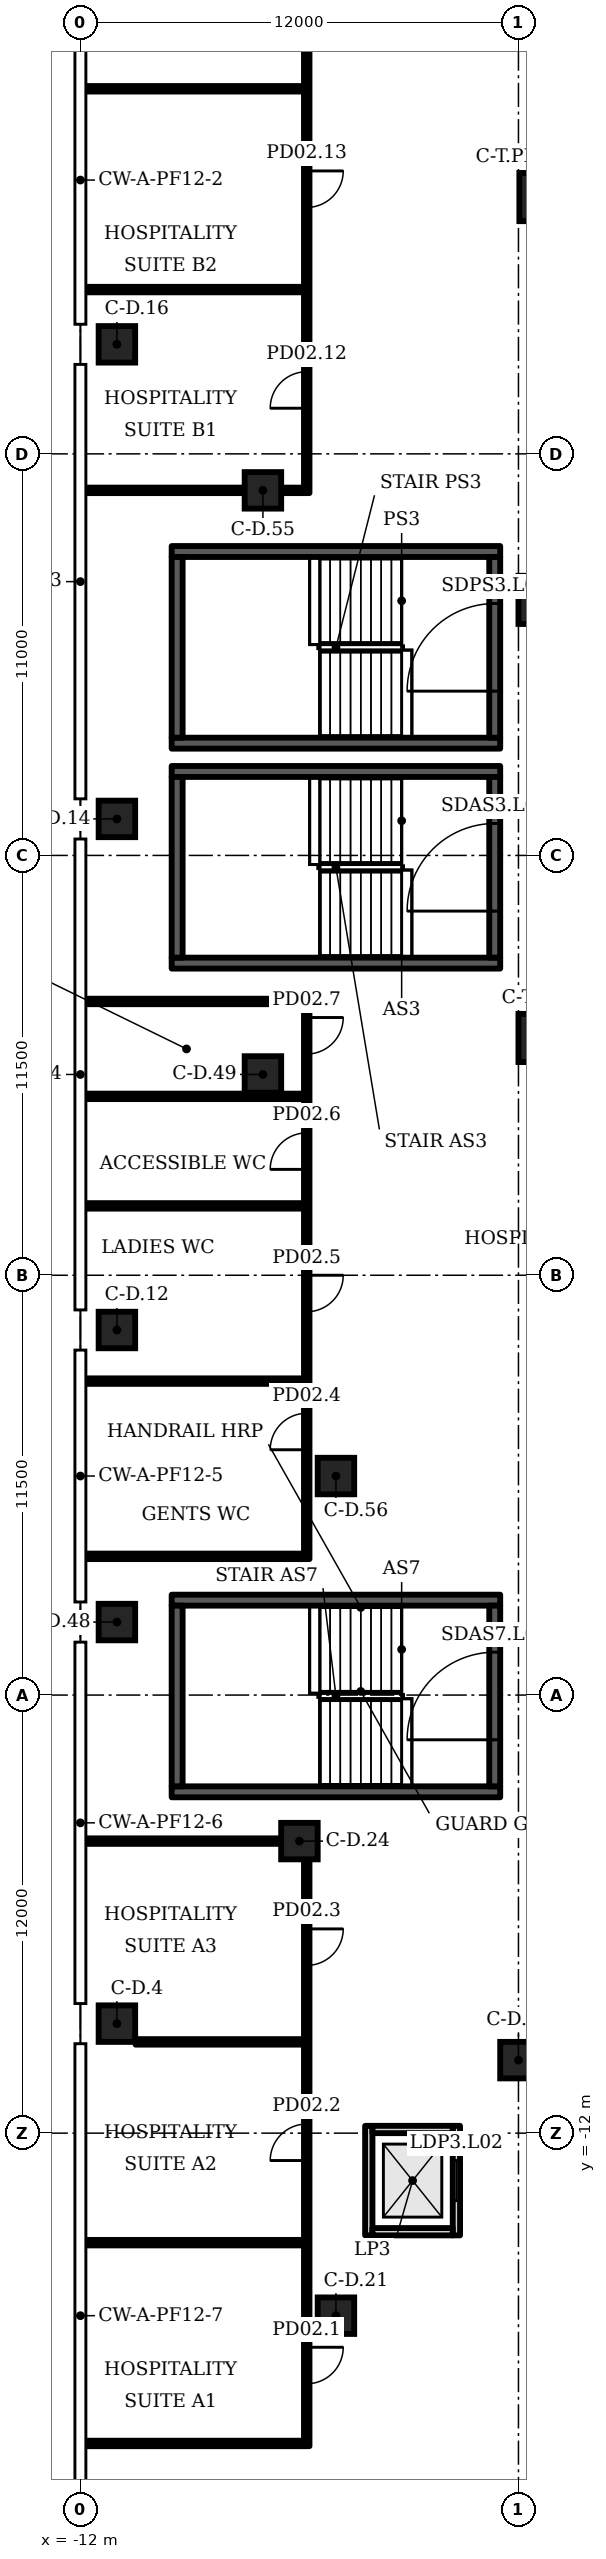
"""IFC4 building model, lengths in metres.
Left out: names, types, materials, properties, quantities, classifications, styles, units other than length and angle.
Written with IfcOpenShell. Run it as: python <this file> out.ifc"""

import sys

from ifc_helpers import new_model, si_unit, direction, frame, frame_2d, origin, origin_2d, place, context, subcontext, project, spatial, rectangle, extrude, element, fill, save


model = new_model("IFC4")
c1 = context("Model", 3, precision=1e-05, world=origin(), true_north=direction((0.0, 1.0)))
c2 = subcontext(c1, "Body", "Model", "MODEL_VIEW")
j1 = project(units=[si_unit("LENGTHUNIT", "METRE"), si_unit("PLANEANGLEUNIT", "RADIAN")], contexts=[c1])
p1 = place(None, origin())
s1 = spatial("IfcSite", under=j1, at=p1, CompositionType="ELEMENT")
p2 = place(p1, origin())
s2 = spatial("IfcBuilding", under=s1, at=p2, CompositionType="ELEMENT")
p3 = place(p2, frame((0.0, 0.0, 15.0)))
s3 = spatial("IfcBuildingStorey", under=s2, at=p3, CompositionType="ELEMENT", Elevation=15.0)
for number, where, z_axis, x_axis in (
    (1, (0.685, 41.034, 0.0), (0.0, 0.0, 1.0), (1.0, 0.0, 0.0)),
    (2, (0.66, 30.0, 0.0), (0.0, 0.0, 1.0), (1.0, 0.0, 0.0)),
    (3, (0.66, 18.0, 0.0), (0.0, 0.0, 1.0), (1.0, 0.0, 0.0)),
):
    element("IfcColumn", number, at=place(p3, frame(where, z_axis=z_axis, x_axis=x_axis)), inside=s3, PredefinedType="COLUMN", context=c2, shape_type="SweptSolid", body=[
        extrude(rectangle(XDim=1.32, YDim=1.32, at=origin_2d()), origin(), (0.0, 0.0, 1.0), 6.5),
    ])
for number, where, z_axis, x_axis in (
    (4, (-11.0, -9.0, 0.0), (0.0, 0.0, 1.0), (1.0, 0.0, 0.0)),
    (5, (-11.0, 10.0, 0.0), (0.0, 0.0, 1.0), (1.0, 0.0, 0.0)),
    (6, (-11.0, 24.0, 0.0), (0.0, 0.0, 1.0), (1.0, 0.0, 0.0)),
    (7, (-11.0, 37.0, 0.0), (0.0, 0.0, 1.0), (1.0, 0.0, 0.0)),
    (8, (-5.0, -17.0, 0.0), (0.0, 0.0, 1.0), (1.0, 0.0, 0.0)),
    (9, (-6.0, -4.0, 0.0), (0.0, 0.0, 1.0), (1.0, 0.0, 0.0)),
    (10, (0.0, -10.0, 0.0), (0.0, 0.0, 1.0), (1.0, 0.0, 0.0)),
    (11, (-11.0, 2.0, 0.0), (0.0, 0.0, 1.0), (1.0, 0.0, 0.0)),
    (12, (-7.0, 17.0, 0.0), (0.0, 0.0, 1.0), (1.0, 0.0, 0.0)),
    (13, (-7.0, 33.0, 0.0), (0.0, 0.0, 1.0), (1.0, 0.0, 0.0)),
    (14, (-5.0, 6.0, 0.0), (0.0, 0.0, 1.0), (1.0, 0.0, 0.0)),
):
    element("IfcColumn", number, at=place(p3, frame(where, z_axis=z_axis, x_axis=x_axis)), inside=s3, PredefinedType="COLUMN", context=c2, shape_type="SweptSolid", body=[
        extrude(rectangle(XDim=1.0, YDim=1.0, at=origin_2d()), origin(), (0.0, 0.0, 1.0), 6.5),
    ])
p4 = place(p3, frame((-11.895, -20.5, 0.0), z_axis=(0.0, 0.0, 1.0), x_axis=(1.0, 0.0, 0.0)))
e15 = element("IfcWall", 15, at=p4, inside=s3, PredefinedType="PARTITIONING", context=c2, shape_type="SweptSolid", body=[
    extrude(rectangle(XDim=6.02, YDim=0.15, at=frame_2d((3.01, 0.0))), origin(), (0.0, 0.0, 1.0), 6.2),
])
p5 = place(p3, frame((-5.8, -20.575, 0.0), z_axis=(0.0, 0.0, 1.0), x_axis=(0.0, 1.0, 0.0)))
e16 = element("IfcWall", 16, at=p5, inside=s3, PredefinedType="PARTITIONING", context=c2, shape_type="SweptSolid", body=[
    extrude(rectangle(XDim=16.065, YDim=0.15, at=frame_2d((8.032, 0.0))), origin(), (0.0, 0.0, 1.0), 6.2),
])
p6 = place(p5, frame((1.71, 0.0, 0.0)))
e17 = element("IfcOpeningElement", 17, at=p6, cuts=e16, PredefinedType="OPENING", context=c2, shape_type="SweptSolid", body=[
    extrude(rectangle(XDim=1.0, YDim=2.1, at=frame_2d((0.5, 1.05))), frame((0.0, 0.085, 0.0), z_axis=(0.0, -1.0, 0.0), x_axis=(1.0, 0.0, 0.0)), (0.0, 0.0, 1.0), 0.17),
])
p7 = place(p5, frame((7.825, 0.0, 0.0)))
e18 = element("IfcOpeningElement", 18, at=p7, cuts=e16, PredefinedType="OPENING", context=c2, shape_type="SweptSolid", body=[
    extrude(rectangle(XDim=1.0, YDim=2.1, at=frame_2d((0.5, 1.05))), frame((0.0, 0.085, 0.0), z_axis=(0.0, -1.0, 0.0), x_axis=(1.0, 0.0, 0.0)), (0.0, 0.0, 1.0), 0.17),
])
p8 = place(p5, frame((13.17, 0.0, 0.0)))
e19 = element("IfcOpeningElement", 19, at=p8, cuts=e16, PredefinedType="OPENING", context=c2, shape_type="SweptSolid", body=[
    extrude(rectangle(XDim=1.0, YDim=2.1, at=frame_2d((0.5, 1.05))), frame((0.0, 0.085, 0.0), z_axis=(0.0, -1.0, 0.0), x_axis=(1.0, 0.0, 0.0)), (0.0, 0.0, 1.0), 0.17),
])
p9 = place(p3, frame((-5.8, 3.725, 0.0), z_axis=(0.0, 0.0, 1.0), x_axis=(0.0, 1.0, 0.0)))
e20 = element("IfcWall", 20, at=p9, inside=s3, PredefinedType="PARTITIONING", context=c2, shape_type="SweptSolid", body=[
    extrude(rectangle(XDim=15.35, YDim=0.15, at=frame_2d((7.675, 0.0))), origin(), (0.0, 0.0, 1.0), 6.2),
])
p10 = place(p9, frame((2.995, 0.0, 0.0)))
e21 = element("IfcOpeningElement", 21, at=p10, cuts=e20, PredefinedType="OPENING", context=c2, shape_type="SweptSolid", body=[
    extrude(rectangle(XDim=1.0, YDim=2.1, at=frame_2d((0.5, 1.05))), frame((0.0, 0.085, 0.0), z_axis=(0.0, -1.0, 0.0), x_axis=(1.0, 0.0, 0.0)), (0.0, 0.0, 1.0), 0.17),
])
p11 = place(p9, frame((6.775, 0.0, 0.0)))
e22 = element("IfcOpeningElement", 22, at=p11, cuts=e20, PredefinedType="OPENING", context=c2, shape_type="SweptSolid", body=[
    extrude(rectangle(XDim=1.0, YDim=2.1, at=frame_2d((0.5, 1.05))), frame((0.0, 0.085, 0.0), z_axis=(0.0, -1.0, 0.0), x_axis=(1.0, 0.0, 0.0)), (0.0, 0.0, 1.0), 0.17),
])
p12 = place(p9, frame((10.675, 0.0, 0.0)))
e23 = element("IfcOpeningElement", 23, at=p12, cuts=e20, PredefinedType="OPENING", context=c2, shape_type="SweptSolid", body=[
    extrude(rectangle(XDim=1.0, YDim=2.1, at=frame_2d((0.5, 1.05))), frame((0.0, 0.085, 0.0), z_axis=(0.0, -1.0, 0.0), x_axis=(1.0, 0.0, 0.0)), (0.0, 0.0, 1.0), 0.17),
])
p13 = place(p9, frame((13.835, 0.0, 0.0)))
e24 = element("IfcOpeningElement", 24, at=p13, cuts=e20, PredefinedType="OPENING", context=c2, shape_type="SweptSolid", body=[
    extrude(rectangle(XDim=1.0, YDim=2.1, at=frame_2d((0.5, 1.05))), frame((0.0, 0.085, 0.0), z_axis=(0.0, -1.0, 0.0), x_axis=(1.0, 0.0, 0.0)), (0.0, 0.0, 1.0), 0.17),
])
p14 = place(p3, frame((-5.8, 32.925, 0.0), z_axis=(0.0, 0.0, 1.0), x_axis=(0.0, 1.0, 0.0)))
e25 = element("IfcWall", 25, at=p14, inside=s3, PredefinedType="PARTITIONING", context=c2, shape_type="SweptSolid", body=[
    extrude(rectangle(XDim=16.65, YDim=0.15, at=frame_2d((8.325, 0.0))), origin(), (0.0, 0.0, 1.0), 6.2),
])
p15 = place(p14, frame((2.325, 0.0, 0.0)))
e26 = element("IfcOpeningElement", 26, at=p15, cuts=e25, PredefinedType="OPENING", context=c2, shape_type="SweptSolid", body=[
    extrude(rectangle(XDim=1.0, YDim=2.1, at=frame_2d((0.5, 1.05))), frame((0.0, 0.085, 0.0), z_axis=(0.0, -1.0, 0.0), x_axis=(1.0, 0.0, 0.0)), (0.0, 0.0, 1.0), 0.17),
])
p16 = place(p14, frame((7.825, 0.0, 0.0)))
e27 = element("IfcOpeningElement", 27, at=p16, cuts=e25, PredefinedType="OPENING", context=c2, shape_type="SweptSolid", body=[
    extrude(rectangle(XDim=1.0, YDim=2.1, at=frame_2d((0.5, 1.05))), frame((0.0, 0.085, 0.0), z_axis=(0.0, -1.0, 0.0), x_axis=(1.0, 0.0, 0.0)), (0.0, 0.0, 1.0), 0.17),
])
p17 = place(p14, frame((13.325, 0.0, 0.0)))
e28 = element("IfcOpeningElement", 28, at=p17, cuts=e25, PredefinedType="OPENING", context=c2, shape_type="SweptSolid", body=[
    extrude(rectangle(XDim=1.0, YDim=2.1, at=frame_2d((0.5, 1.05))), frame((0.0, 0.085, 0.0), z_axis=(0.0, -1.0, 0.0), x_axis=(1.0, 0.0, 0.0)), (0.0, 0.0, 1.0), 0.17),
])
p18 = place(p3, frame((-11.895, -15.0, 0.0), z_axis=(0.0, 0.0, 1.0), x_axis=(1.0, 0.0, 0.0)))
e29 = element("IfcWall", 29, at=p18, inside=s3, PredefinedType="PARTITIONING", context=c2, shape_type="SweptSolid", body=[
    extrude(rectangle(XDim=6.02, YDim=0.15, at=frame_2d((3.01, 0.0))), origin(), (0.0, 0.0, 1.0), 6.2),
])
p19 = place(p3, frame((-10.49, -9.5, 0.0), z_axis=(0.0, 0.0, 1.0), x_axis=(1.0, 0.0, 0.0)))
e30 = element("IfcWall", 30, at=p19, inside=s3, PredefinedType="PARTITIONING", context=c2, shape_type="SweptSolid", body=[
    extrude(rectangle(XDim=4.615, YDim=0.15, at=frame_2d((2.308, 0.0))), origin(), (0.0, 0.0, 1.0), 6.2),
])
p20 = place(p3, frame((-11.895, -4.0, 0.0), z_axis=(0.0, 0.0, 1.0), x_axis=(1.0, 0.0, 0.0)))
e31 = element("IfcWall", 31, at=p20, inside=s3, PredefinedType="PARTITIONING", context=c2, shape_type="SweptSolid", body=[
    extrude(rectangle(XDim=5.385, YDim=0.15, at=frame_2d((2.692, 0.0))), origin(), (0.0, 0.0, 1.0), 6.2),
])
for number, where, z_axis, x_axis in (
    (32, (-11.895, 3.8, 0.0), (0.0, 0.0, 1.0), (1.0, 0.0, 0.0)),
    (33, (-11.895, 8.6, 0.0), (0.0, 0.0, 1.0), (1.0, 0.0, 0.0)),
    (34, (-11.895, 13.4, 0.0), (0.0, 0.0, 1.0), (1.0, 0.0, 0.0)),
    (35, (-11.895, 16.4, 0.0), (0.0, 0.0, 1.0), (1.0, 0.0, 0.0)),
    (36, (-11.895, 19.0, 0.0), (0.0, 0.0, 1.0), (1.0, 0.0, 0.0)),
):
    element("IfcWall", number, at=place(p3, frame(where, z_axis=z_axis, x_axis=x_axis)), inside=s3, PredefinedType="PARTITIONING", context=c2, shape_type="SweptSolid", body=[
        extrude(rectangle(XDim=6.02, YDim=0.15, at=frame_2d((3.01, 0.0))), origin(), (0.0, 0.0, 1.0), 6.2),
    ])
p21 = place(p3, frame((-11.895, 33.0, 0.0), z_axis=(0.0, 0.0, 1.0), x_axis=(1.0, 0.0, 0.0)))
e37 = element("IfcWall", 37, at=p21, inside=s3, PredefinedType="PARTITIONING", context=c2, shape_type="SweptSolid", body=[
    extrude(rectangle(XDim=4.385, YDim=0.15, at=frame_2d((2.192, 0.0))), origin(), (0.0, 0.0, 1.0), 6.2),
])
p22 = place(p3, frame((-6.49, 33.0, 0.0), z_axis=(0.0, 0.0, 1.0), x_axis=(1.0, 0.0, 0.0)))
e38 = element("IfcWall", 38, at=p22, inside=s3, PredefinedType="PARTITIONING", context=c2, shape_type="SweptSolid", body=[
    extrude(rectangle(XDim=0.615, YDim=0.15, at=frame_2d((0.308, 0.0))), origin(), (0.0, 0.0, 1.0), 6.2),
])
for number, where, z_axis, x_axis in (
    (39, (-11.895, 38.5, 0.0), (0.0, 0.0, 1.0), (1.0, 0.0, 0.0)),
    (40, (-11.895, 44.0, 0.0), (0.0, 0.0, 1.0), (1.0, 0.0, 0.0)),
):
    element("IfcWall", number, at=place(p3, frame(where, z_axis=z_axis, x_axis=x_axis)), inside=s3, PredefinedType="PARTITIONING", context=c2, shape_type="SweptSolid", body=[
        extrude(rectangle(XDim=6.02, YDim=0.15, at=frame_2d((3.01, 0.0))), origin(), (0.0, 0.0, 1.0), 6.2),
    ])
for number, where, z_axis, x_axis in (
    (41, (-9.5, -2.65, 0.0), (0.0, 0.0, 1.0), (1.0, 0.0, 0.0)),
    (42, (-9.5, 2.6, 0.0), (0.0, 0.0, 1.0), (1.0, 0.0, 0.0)),
):
    element("IfcWall", number, at=place(p3, frame(where, z_axis=z_axis, x_axis=x_axis)), inside=s3, PredefinedType="SHEAR", context=c2, shape_type="SweptSolid", body=[
        extrude(rectangle(XDim=9.0, YDim=0.3, at=frame_2d((4.5, 0.0))), origin(), (0.0, 0.0, 1.0), 6.2),
    ])
p23 = place(p3, frame((-9.35, -2.5, 0.0), z_axis=(0.0, 0.0, 1.0), x_axis=(0.0, 1.0, 0.0)))
e43 = element("IfcWall", 43, at=p23, inside=s3, PredefinedType="SHEAR", context=c2, shape_type="SweptSolid", body=[
    extrude(rectangle(XDim=4.95, YDim=0.3, at=frame_2d((2.475, 0.0))), origin(), (0.0, 0.0, 1.0), 6.2),
])
p24 = place(p3, frame((-0.65, -2.5, 0.0), z_axis=(0.0, 0.0, 1.0), x_axis=(0.0, 1.0, 0.0)))
e44 = element("IfcWall", 44, at=p24, inside=s3, PredefinedType="SHEAR", context=c2, shape_type="SweptSolid", body=[
    extrude(rectangle(XDim=4.95, YDim=0.3, at=frame_2d((2.475, 0.0))), origin(), (0.0, 0.0, 1.0), 6.2),
])
p25 = place(p24, frame((1.275, 0.0, 0.0)))
e45 = element("IfcOpeningElement", 45, at=p25, cuts=e44, PredefinedType="OPENING", context=c2, shape_type="SweptSolid", body=[
    extrude(rectangle(XDim=2.4, YDim=2.1, at=frame_2d((1.2, 1.05))), frame((0.0, 0.16, 0.0), z_axis=(0.0, -1.0, 0.0), x_axis=(1.0, 0.0, 0.0)), (0.0, 0.0, 1.0), 0.32),
])
for number, where, z_axis, x_axis in (
    (46, (-9.5, 20.05, 0.0), (0.0, 0.0, 1.0), (1.0, 0.0, 0.0)),
    (47, (-9.5, 25.3, 0.0), (0.0, 0.0, 1.0), (1.0, 0.0, 0.0)),
):
    element("IfcWall", number, at=place(p3, frame(where, z_axis=z_axis, x_axis=x_axis)), inside=s3, PredefinedType="SHEAR", context=c2, shape_type="SweptSolid", body=[
        extrude(rectangle(XDim=9.0, YDim=0.3, at=frame_2d((4.5, 0.0))), origin(), (0.0, 0.0, 1.0), 6.2),
    ])
p26 = place(p3, frame((-9.35, 20.2, 0.0), z_axis=(0.0, 0.0, 1.0), x_axis=(0.0, 1.0, 0.0)))
e48 = element("IfcWall", 48, at=p26, inside=s3, PredefinedType="SHEAR", context=c2, shape_type="SweptSolid", body=[
    extrude(rectangle(XDim=4.95, YDim=0.3, at=frame_2d((2.475, 0.0))), origin(), (0.0, 0.0, 1.0), 6.2),
])
p27 = place(p3, frame((-0.65, 20.2, 0.0), z_axis=(0.0, 0.0, 1.0), x_axis=(0.0, 1.0, 0.0)))
e49 = element("IfcWall", 49, at=p27, inside=s3, PredefinedType="SHEAR", context=c2, shape_type="SweptSolid", body=[
    extrude(rectangle(XDim=4.95, YDim=0.3, at=frame_2d((2.475, 0.0))), origin(), (0.0, 0.0, 1.0), 6.2),
])
p28 = place(p27, frame((1.275, 0.0, 0.0)))
e50 = element("IfcOpeningElement", 50, at=p28, cuts=e49, PredefinedType="OPENING", context=c2, shape_type="SweptSolid", body=[
    extrude(rectangle(XDim=2.4, YDim=2.1, at=frame_2d((1.2, 1.05))), frame((0.0, 0.16, 0.0), z_axis=(0.0, -1.0, 0.0), x_axis=(1.0, 0.0, 0.0)), (0.0, 0.0, 1.0), 0.32),
])
for number, where, z_axis, x_axis in (
    (51, (-9.5, 26.075, 0.0), (0.0, 0.0, 1.0), (1.0, 0.0, 0.0)),
    (52, (-9.5, 31.325, 0.0), (0.0, 0.0, 1.0), (1.0, 0.0, 0.0)),
):
    element("IfcWall", number, at=place(p3, frame(where, z_axis=z_axis, x_axis=x_axis)), inside=s3, PredefinedType="SHEAR", context=c2, shape_type="SweptSolid", body=[
        extrude(rectangle(XDim=9.0, YDim=0.3, at=frame_2d((4.5, 0.0))), origin(), (0.0, 0.0, 1.0), 6.2),
    ])
p29 = place(p3, frame((-9.35, 26.225, 0.0), z_axis=(0.0, 0.0, 1.0), x_axis=(0.0, 1.0, 0.0)))
e53 = element("IfcWall", 53, at=p29, inside=s3, PredefinedType="SHEAR", context=c2, shape_type="SweptSolid", body=[
    extrude(rectangle(XDim=4.95, YDim=0.3, at=frame_2d((2.475, 0.0))), origin(), (0.0, 0.0, 1.0), 6.2),
])
p30 = place(p3, frame((-0.65, 26.225, 0.0), z_axis=(0.0, 0.0, 1.0), x_axis=(0.0, 1.0, 0.0)))
e54 = element("IfcWall", 54, at=p30, inside=s3, PredefinedType="SHEAR", context=c2, shape_type="SweptSolid", body=[
    extrude(rectangle(XDim=4.95, YDim=0.3, at=frame_2d((2.475, 0.0))), origin(), (0.0, 0.0, 1.0), 6.2),
])
p31 = place(p30, frame((1.275, 0.0, 0.0)))
e55 = element("IfcOpeningElement", 55, at=p31, cuts=e54, PredefinedType="OPENING", context=c2, shape_type="SweptSolid", body=[
    extrude(rectangle(XDim=2.4, YDim=2.1, at=frame_2d((1.2, 1.05))), frame((0.0, 0.16, 0.0), z_axis=(0.0, -1.0, 0.0), x_axis=(1.0, 0.0, 0.0)), (0.0, 0.0, 1.0), 0.32),
])
p32 = place(p3, frame((-4.1, -14.8, 0.0), z_axis=(0.0, 0.0, 1.0), x_axis=(0.0, 1.0, 0.0)))
e56 = element("IfcWall", 56, at=p32, inside=s3, PredefinedType="PARTITIONING", context=c2, shape_type="SweptSolid", body=[
    extrude(rectangle(XDim=3.0, YDim=0.2, at=frame_2d((1.5, 0.0))), origin(), (0.0, 0.0, 1.0), 6.2),
])
p33 = place(p3, frame((-1.7, -14.8, 0.0), z_axis=(0.0, 0.0, 1.0), x_axis=(0.0, 1.0, 0.0)))
e57 = element("IfcWall", 57, at=p33, inside=s3, PredefinedType="PARTITIONING", context=c2, shape_type="SweptSolid", body=[
    extrude(rectangle(XDim=3.0, YDim=0.2, at=frame_2d((1.5, 0.0))), origin(), (0.0, 0.0, 1.0), 6.2),
])
p34 = place(p33, frame((0.95, 0.0, 0.0)))
e58 = element("IfcOpeningElement", 58, at=p34, cuts=e57, PredefinedType="OPENING", context=c2, shape_type="SweptSolid", body=[
    extrude(rectangle(XDim=1.1, YDim=2.1, at=frame_2d((0.55, 1.05))), frame((0.0, 0.11, 0.0), z_axis=(0.0, -1.0, 0.0), x_axis=(1.0, 0.0, 0.0)), (0.0, 0.0, 1.0), 0.22),
])
for number, where, z_axis, x_axis in (
    (59, (-4.0, -14.7, 0.0), (0.0, 0.0, 1.0), (1.0, 0.0, 0.0)),
    (60, (-4.0, -11.9, 0.0), (0.0, 0.0, 1.0), (1.0, 0.0, 0.0)),
):
    element("IfcWall", number, at=place(p3, frame(where, z_axis=z_axis, x_axis=x_axis)), inside=s3, PredefinedType="PARTITIONING", context=c2, shape_type="SweptSolid", body=[
        extrude(rectangle(XDim=2.2, YDim=0.2, at=frame_2d((1.1, 0.0))), origin(), (0.0, 0.0, 1.0), 6.2),
    ])
p35 = place(p6, origin())
e61 = element("IfcDoor", 61, at=p35, inside=s3, OperationType="SINGLE_SWING_RIGHT", PredefinedType="DOOR", context=c2, shape_type="SweptSolid", body=[
    extrude(rectangle(XDim=1.0, YDim=2.1, at=frame_2d((0.5, 1.05))), frame((0.0, 0.025, 0.0), z_axis=(0.0, -1.0, 0.0), x_axis=(1.0, 0.0, 0.0)), (0.0, 0.0, 1.0), 0.05),
])
fill(e17, e61)
p36 = place(p7, origin())
e62 = element("IfcDoor", 62, at=p36, inside=s3, OperationType="SINGLE_SWING_LEFT", PredefinedType="DOOR", context=c2, shape_type="SweptSolid", body=[
    extrude(rectangle(XDim=1.0, YDim=2.1, at=frame_2d((0.5, 1.05))), frame((0.0, 0.025, 0.0), z_axis=(0.0, -1.0, 0.0), x_axis=(1.0, 0.0, 0.0)), (0.0, 0.0, 1.0), 0.05),
])
fill(e18, e62)
p37 = place(p8, origin())
e63 = element("IfcDoor", 63, at=p37, inside=s3, OperationType="SINGLE_SWING_RIGHT", PredefinedType="DOOR", context=c2, shape_type="SweptSolid", body=[
    extrude(rectangle(XDim=1.0, YDim=2.1, at=frame_2d((0.5, 1.05))), frame((0.0, 0.025, 0.0), z_axis=(0.0, -1.0, 0.0), x_axis=(1.0, 0.0, 0.0)), (0.0, 0.0, 1.0), 0.05),
])
fill(e19, e63)
p38 = place(p10, origin())
e64 = element("IfcDoor", 64, at=p38, inside=s3, OperationType="SINGLE_SWING_LEFT", PredefinedType="DOOR", context=c2, shape_type="SweptSolid", body=[
    extrude(rectangle(XDim=1.0, YDim=2.1, at=frame_2d((0.5, 1.05))), frame((0.0, 0.025, 0.0), z_axis=(0.0, -1.0, 0.0), x_axis=(1.0, 0.0, 0.0)), (0.0, 0.0, 1.0), 0.05),
])
fill(e21, e64)
p39 = place(p11, origin())
e65 = element("IfcDoor", 65, at=p39, inside=s3, OperationType="SINGLE_SWING_RIGHT", PredefinedType="DOOR", context=c2, shape_type="SweptSolid", body=[
    extrude(rectangle(XDim=1.0, YDim=2.1, at=frame_2d((0.5, 1.05))), frame((0.0, 0.025, 0.0), z_axis=(0.0, -1.0, 0.0), x_axis=(1.0, 0.0, 0.0)), (0.0, 0.0, 1.0), 0.05),
])
fill(e22, e65)
p40 = place(p12, origin())
e66 = element("IfcDoor", 66, at=p40, inside=s3, OperationType="SINGLE_SWING_LEFT", PredefinedType="DOOR", context=c2, shape_type="SweptSolid", body=[
    extrude(rectangle(XDim=1.0, YDim=2.1, at=frame_2d((0.5, 1.05))), frame((0.0, 0.025, 0.0), z_axis=(0.0, -1.0, 0.0), x_axis=(1.0, 0.0, 0.0)), (0.0, 0.0, 1.0), 0.05),
])
fill(e23, e66)
p41 = place(p13, origin())
e67 = element("IfcDoor", 67, at=p41, inside=s3, OperationType="SINGLE_SWING_RIGHT", PredefinedType="DOOR", context=c2, shape_type="SweptSolid", body=[
    extrude(rectangle(XDim=1.0, YDim=2.1, at=frame_2d((0.5, 1.05))), frame((0.0, 0.025, 0.0), z_axis=(0.0, -1.0, 0.0), x_axis=(1.0, 0.0, 0.0)), (0.0, 0.0, 1.0), 0.05),
])
fill(e24, e67)
p42 = place(p15, origin())
e68 = element("IfcDoor", 68, at=p42, inside=s3, OperationType="SINGLE_SWING_LEFT", PredefinedType="DOOR", context=c2, shape_type="SweptSolid", body=[
    extrude(rectangle(XDim=1.0, YDim=2.1, at=frame_2d((0.5, 1.05))), frame((0.0, 0.025, 0.0), z_axis=(0.0, -1.0, 0.0), x_axis=(1.0, 0.0, 0.0)), (0.0, 0.0, 1.0), 0.05),
])
fill(e26, e68)
p43 = place(p16, origin())
e69 = element("IfcDoor", 69, at=p43, inside=s3, OperationType="SINGLE_SWING_RIGHT", PredefinedType="DOOR", context=c2, shape_type="SweptSolid", body=[
    extrude(rectangle(XDim=1.0, YDim=2.1, at=frame_2d((0.5, 1.05))), frame((0.0, 0.025, 0.0), z_axis=(0.0, -1.0, 0.0), x_axis=(1.0, 0.0, 0.0)), (0.0, 0.0, 1.0), 0.05),
])
fill(e27, e69)
p44 = place(p25, origin())
e70 = element("IfcDoor", 70, at=p44, inside=s3, OperationType="DOUBLE_DOOR_SINGLE_SWING", PredefinedType="DOOR", context=c2, shape_type="SweptSolid", body=[
    extrude(rectangle(XDim=2.4, YDim=2.1, at=frame_2d((1.2, 1.05))), frame((0.0, 0.025, 0.0), z_axis=(0.0, -1.0, 0.0), x_axis=(1.0, 0.0, 0.0)), (0.0, 0.0, 1.0), 0.05),
])
fill(e45, e70)
p45 = place(p28, origin())
e71 = element("IfcDoor", 71, at=p45, inside=s3, OperationType="DOUBLE_DOOR_SINGLE_SWING", PredefinedType="DOOR", context=c2, shape_type="SweptSolid", body=[
    extrude(rectangle(XDim=2.4, YDim=2.1, at=frame_2d((1.2, 1.05))), frame((0.0, 0.025, 0.0), z_axis=(0.0, -1.0, 0.0), x_axis=(1.0, 0.0, 0.0)), (0.0, 0.0, 1.0), 0.05),
])
fill(e50, e71)
p46 = place(p31, origin())
e72 = element("IfcDoor", 72, at=p46, inside=s3, OperationType="DOUBLE_DOOR_SINGLE_SWING", PredefinedType="DOOR", context=c2, shape_type="SweptSolid", body=[
    extrude(rectangle(XDim=2.4, YDim=2.1, at=frame_2d((1.2, 1.05))), frame((0.0, 0.025, 0.0), z_axis=(0.0, -1.0, 0.0), x_axis=(1.0, 0.0, 0.0)), (0.0, 0.0, 1.0), 0.05),
])
fill(e55, e72)
p47 = place(p34, origin())
e73 = element("IfcDoor", 73, at=p47, inside=s3, OperationType="DOUBLE_DOOR_SLIDING", PredefinedType="DOOR", context=c2, shape_type="SweptSolid", body=[
    extrude(rectangle(XDim=1.1, YDim=2.1, at=frame_2d((0.55, 1.05))), frame((0.0, 0.025, 0.0), z_axis=(0.0, -1.0, 0.0), x_axis=(1.0, 0.0, 0.0)), (0.0, 0.0, 1.0), 0.05),
])
fill(e58, e73)
save(model, sys.argv[1])
